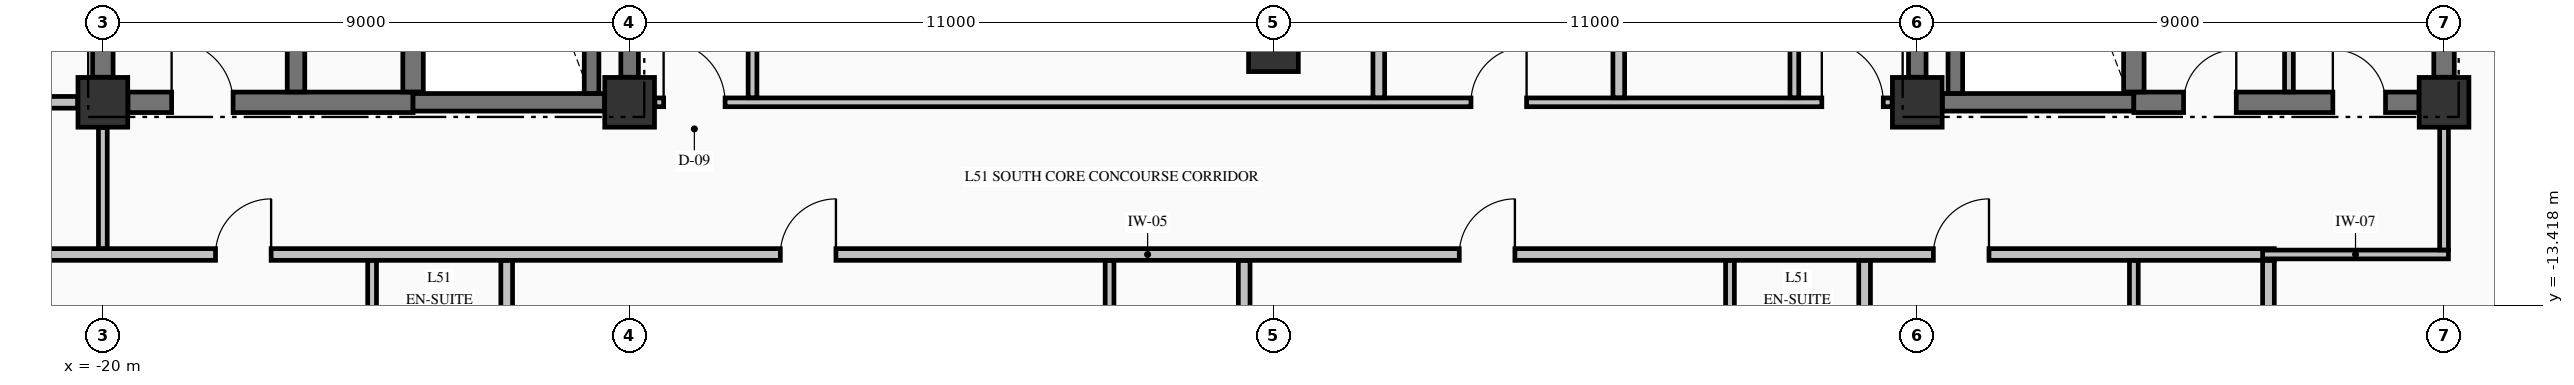
"""IFC4 building model, lengths in metres.
Left out: names, types, materials, properties, quantities, classifications, styles, units other than length and angle.
Written with IfcOpenShell. Run it as: python <this file> out.ifc"""

import sys

from ifc_helpers import new_model, si_unit, direction, frame, frame_2d, origin, origin_2d, place, context, subcontext, project, spatial, rectangle, extrude, element, fill, save


model = new_model("IFC4")
c1 = context("Model", 3, precision=1e-05, world=origin(), true_north=direction((0.0, 1.0)))
c2 = subcontext(c1, "Body", "Model", "MODEL_VIEW")
j1 = project(units=[si_unit("LENGTHUNIT", "METRE"), si_unit("PLANEANGLEUNIT", "RADIAN")], contexts=[c1])
p1 = place(None, origin())
s1 = spatial("IfcSite", under=j1, at=p1, CompositionType="ELEMENT")
p2 = place(p1, origin())
s2 = spatial("IfcBuilding", under=s1, at=p2, CompositionType="ELEMENT")
p3 = place(p2, frame((0.0, 0.0, 198.26)))
s3 = spatial("IfcBuildingStorey", under=s2, at=p3, CompositionType="ELEMENT", Elevation=198.26)
for number, where, z_axis, x_axis in (
    (1, (-20.0, -9.95, -0.25), (0.0, 0.0, 1.0), (1.0, 0.0, 0.0)),
    (2, (-11.0, -9.95, -0.25), (0.0, 0.0, 1.0), (1.0, 0.0, 0.0)),
    (3, (11.0, -9.95, -0.25), (0.0, 0.0, 1.0), (1.0, 0.0, 0.0)),
    (4, (20.0, -9.95, -0.25), (0.0, 0.0, 1.0), (1.0, 0.0, 0.0)),
    (5, (0.0, -9.0, -0.25), (0.0, 0.0, 1.0), (1.0, 0.0, 0.0)),
):
    element("IfcColumn", number, at=place(p3, frame(where, z_axis=z_axis, x_axis=x_axis)), inside=s3, PredefinedType="COLUMN", context=c2, shape_type="SweptSolid", body=[
        extrude(rectangle(XDim=0.85, YDim=0.85, at=origin_2d()), origin(), (0.0, 0.0, 1.0), 3.4),
    ])
p4 = place(p3, frame((-19.571, -9.95, 0.0), z_axis=(0.0, 0.0, 1.0), x_axis=(1.0, 0.0, 0.0)))
e6 = element("IfcWall", 6, at=p4, inside=s3, PredefinedType="SHEAR", context=c2, shape_type="SweptSolid", body=[
    extrude(rectangle(XDim=4.871, YDim=0.35, at=frame_2d((2.436, 0.0))), origin(), (0.0, 0.0, 1.0), 3.15),
])
p5 = place(p4, frame((0.746, 0.0, 0.0)))
e7 = element("IfcOpeningElement", 7, at=p5, cuts=e6, PredefinedType="OPENING", context=c2, shape_type="SweptSolid", body=[
    extrude(rectangle(XDim=1.05, YDim=2.15, at=frame_2d((0.525, 1.075))), frame((0.0, 0.185, 0.0), z_axis=(0.0, -1.0, 0.0), x_axis=(1.0, 0.0, 0.0)), (0.0, 0.0, 1.0), 0.37),
])
for number, where, z_axis, x_axis in (
    (8, (-14.7, -9.95, 0.0), (0.0, 0.0, 1.0), (1.0, 0.0, 0.0)),
    (9, (11.429, -9.95, 0.0), (0.0, 0.0, 1.0), (1.0, 0.0, 0.0)),
):
    element("IfcWall", number, at=place(p3, frame(where, z_axis=z_axis, x_axis=x_axis)), inside=s3, PredefinedType="SHEAR", context=c2, shape_type="SweptSolid", body=[
        extrude(rectangle(XDim=3.271, YDim=0.3, at=frame_2d((1.635, 0.0))), origin(), (0.0, 0.0, 1.0), 3.15),
    ])
p6 = place(p3, frame((14.7, -9.95, 0.0), z_axis=(0.0, 0.0, 1.0), x_axis=(1.0, 0.0, 0.0)))
e10 = element("IfcWall", 10, at=p6, inside=s3, PredefinedType="SHEAR", context=c2, shape_type="SweptSolid", body=[
    extrude(rectangle(XDim=4.871, YDim=0.35, at=frame_2d((2.436, 0.0))), origin(), (0.0, 0.0, 1.0), 3.15),
])
p7 = place(p6, frame((0.85, 0.0, 0.0)))
e11 = element("IfcOpeningElement", 11, at=p7, cuts=e10, PredefinedType="OPENING", context=c2, shape_type="SweptSolid", body=[
    extrude(rectangle(XDim=0.9, YDim=2.15, at=frame_2d((0.45, 1.075))), frame((0.0, 0.185, 0.0), z_axis=(0.0, -1.0, 0.0), x_axis=(1.0, 0.0, 0.0)), (0.0, 0.0, 1.0), 0.37),
])
p8 = place(p6, frame((3.4, 0.0, 0.0)))
e12 = element("IfcOpeningElement", 12, at=p8, cuts=e10, PredefinedType="OPENING", context=c2, shape_type="SweptSolid", body=[
    extrude(rectangle(XDim=0.9, YDim=2.15, at=frame_2d((0.45, 1.075))), frame((0.0, 0.185, 0.0), z_axis=(0.0, -1.0, 0.0), x_axis=(1.0, 0.0, 0.0)), (0.0, 0.0, 1.0), 0.37),
])
p9 = place(p3, frame((-22.1, -12.55, 0.0), z_axis=(0.0, 0.0, 1.0), x_axis=(1.0, 0.0, 0.0)))
e13 = element("IfcWall", 13, at=p9, inside=s3, PredefinedType="PARTITIONING", context=c2, shape_type="SweptSolid", body=[
    extrude(rectangle(XDim=39.2, YDim=0.2, at=frame_2d((19.6, 0.0))), origin(), (0.0, 0.0, 1.0), 3.15),
])
p10 = place(p9, frame((4.025, 0.0, 0.0)))
e14 = element("IfcOpeningElement", 14, at=p10, cuts=e13, PredefinedType="OPENING", context=c2, shape_type="SweptSolid", body=[
    extrude(rectangle(XDim=0.95, YDim=2.15, at=frame_2d((0.475, 1.075))), frame((0.0, 0.11, 0.0), z_axis=(0.0, -1.0, 0.0), x_axis=(1.0, 0.0, 0.0)), (0.0, 0.0, 1.0), 0.22),
])
p11 = place(p9, frame((13.675, 0.0, 0.0)))
e15 = element("IfcOpeningElement", 15, at=p11, cuts=e13, PredefinedType="OPENING", context=c2, shape_type="SweptSolid", body=[
    extrude(rectangle(XDim=0.95, YDim=2.15, at=frame_2d((0.475, 1.075))), frame((0.0, 0.11, 0.0), z_axis=(0.0, -1.0, 0.0), x_axis=(1.0, 0.0, 0.0)), (0.0, 0.0, 1.0), 0.22),
])
p12 = place(p9, frame((25.275, 0.0, 0.0)))
e16 = element("IfcOpeningElement", 16, at=p12, cuts=e13, PredefinedType="OPENING", context=c2, shape_type="SweptSolid", body=[
    extrude(rectangle(XDim=0.95, YDim=2.15, at=frame_2d((0.475, 1.075))), frame((0.0, 0.11, 0.0), z_axis=(0.0, -1.0, 0.0), x_axis=(1.0, 0.0, 0.0)), (0.0, 0.0, 1.0), 0.22),
])
p13 = place(p9, frame((33.375, 0.0, 0.0)))
e17 = element("IfcOpeningElement", 17, at=p13, cuts=e13, PredefinedType="OPENING", context=c2, shape_type="SweptSolid", body=[
    extrude(rectangle(XDim=0.95, YDim=2.15, at=frame_2d((0.475, 1.075))), frame((0.0, 0.11, 0.0), z_axis=(0.0, -1.0, 0.0), x_axis=(1.0, 0.0, 0.0)), (0.0, 0.0, 1.0), 0.22),
])
p14 = place(p3, frame((16.9, -12.55, 0.0), z_axis=(0.0, 0.0, 1.0), x_axis=(1.0, 0.0, 0.0)))
e18 = element("IfcWall", 18, at=p14, inside=s3, PredefinedType="PARTITIONING", context=c2, shape_type="SweptSolid", body=[
    extrude(rectangle(XDim=3.175, YDim=0.15, at=frame_2d((1.587, 0.0))), origin(), (0.0, 0.0, 1.0), 3.15),
])
p15 = place(p3, frame((-26.835, -9.95, 0.0), z_axis=(0.0, 0.0, 1.0), x_axis=(1.0, 0.0, 0.0)))
e19 = element("IfcWall", 19, at=p15, inside=s3, PredefinedType="PARTITIONING", context=c2, shape_type="SweptSolid", body=[
    extrude(rectangle(XDim=6.404, YDim=0.2, at=frame_2d((3.202, 0.0))), origin(), (0.0, 0.0, 1.0), 3.15),
])
p16 = place(p3, frame((-10.569, -9.95, 0.0), z_axis=(0.0, 0.0, 1.0), x_axis=(1.0, 0.0, 0.0)))
e20 = element("IfcWall", 20, at=p16, inside=s3, PredefinedType="PARTITIONING", context=c2, shape_type="SweptSolid", body=[
    extrude(rectangle(XDim=21.138, YDim=0.15, at=frame_2d((10.569, 0.0))), origin(), (0.0, 0.0, 1.0), 3.15),
])
p17 = place(p16, frame((0.15, 0.0, 0.0)))
e21 = element("IfcOpeningElement", 21, at=p17, cuts=e20, PredefinedType="OPENING", context=c2, shape_type="SweptSolid", body=[
    extrude(rectangle(XDim=1.05, YDim=2.15, at=frame_2d((0.525, 1.075))), frame((0.0, 0.085, 0.0), z_axis=(0.0, -1.0, 0.0), x_axis=(1.0, 0.0, 0.0)), (0.0, 0.0, 1.0), 0.17),
])
p18 = place(p16, frame((19.938, 0.0, 0.0)))
e22 = element("IfcOpeningElement", 22, at=p18, cuts=e20, PredefinedType="OPENING", context=c2, shape_type="SweptSolid", body=[
    extrude(rectangle(XDim=1.05, YDim=2.15, at=frame_2d((0.525, 1.075))), frame((0.0, 0.085, 0.0), z_axis=(0.0, -1.0, 0.0), x_axis=(1.0, 0.0, 0.0)), (0.0, 0.0, 1.0), 0.17),
])
p19 = place(p16, frame((13.944, 0.0, 0.0)))
e23 = element("IfcOpeningElement", 23, at=p19, cuts=e20, PredefinedType="OPENING", context=c2, shape_type="SweptSolid", body=[
    extrude(rectangle(XDim=0.95, YDim=2.15, at=frame_2d((0.475, 1.075))), frame((0.0, 0.085, 0.0), z_axis=(0.0, -1.0, 0.0), x_axis=(1.0, 0.0, 0.0)), (0.0, 0.0, 1.0), 0.17),
])
p20 = place(p3, frame((-20.0, -9.521, 0.0), z_axis=(0.0, 0.0, 1.0), x_axis=(0.0, 1.0, 0.0)))
e24 = element("IfcWall", 24, at=p20, inside=s3, PredefinedType="SHEAR", context=c2, shape_type="SweptSolid", body=[
    extrude(rectangle(XDim=9.092, YDim=0.35, at=frame_2d((4.546, 0.0))), origin(), (0.0, 0.0, 1.0), 3.15),
])
p21 = place(p3, frame((-16.7, -9.773, 0.0), z_axis=(0.0, 0.0, 1.0), x_axis=(0.0, 1.0, 0.0)))
e25 = element("IfcWall", 25, at=p21, inside=s3, PredefinedType="SHEAR", context=c2, shape_type="SweptSolid", body=[
    extrude(rectangle(XDim=9.371, YDim=0.3, at=frame_2d((4.686, 0.0))), origin(), (0.0, 0.0, 1.0), 3.15),
])
p22 = place(p3, frame((-14.7, -9.773, 0.0), z_axis=(0.0, 0.0, 1.0), x_axis=(0.0, 1.0, 0.0)))
e26 = element("IfcWall", 26, at=p22, inside=s3, PredefinedType="SHEAR", context=c2, shape_type="SweptSolid", body=[
    extrude(rectangle(XDim=9.371, YDim=0.35, at=frame_2d((4.686, 0.0))), origin(), (0.0, 0.0, 1.0), 3.15),
])
p23 = place(p3, frame((-11.65, -9.798, 0.0), z_axis=(0.0, 0.0, 1.0), x_axis=(0.0, 1.0, 0.0)))
e27 = element("IfcWall", 27, at=p23, inside=s3, PredefinedType="SOLIDWALL", context=c2, shape_type="SweptSolid", body=[
    extrude(rectangle(XDim=9.396, YDim=0.25, at=frame_2d((4.698, 0.0))), origin(), (0.0, 0.0, 1.0), 3.15),
])
for number, where, z_axis, x_axis in (
    (28, (-11.0, -9.521, 0.0), (0.0, 0.0, 1.0), (0.0, 1.0, 0.0)),
    (29, (11.0, -9.521, 0.0), (0.0, 0.0, 1.0), (0.0, 1.0, 0.0)),
):
    element("IfcWall", number, at=place(p3, frame(where, z_axis=z_axis, x_axis=x_axis)), inside=s3, PredefinedType="SHEAR", context=c2, shape_type="SweptSolid", body=[
        extrude(rectangle(XDim=9.092, YDim=0.3, at=frame_2d((4.546, 0.0))), origin(), (0.0, 0.0, 1.0), 3.15),
    ])
p24 = place(p3, frame((11.65, -9.798, 0.0), z_axis=(0.0, 0.0, 1.0), x_axis=(0.0, 1.0, 0.0)))
e30 = element("IfcWall", 30, at=p24, inside=s3, PredefinedType="SOLIDWALL", context=c2, shape_type="SweptSolid", body=[
    extrude(rectangle(XDim=9.396, YDim=0.25, at=frame_2d((4.698, 0.0))), origin(), (0.0, 0.0, 1.0), 3.15),
])
p25 = place(p3, frame((14.7, -9.773, 0.0), z_axis=(0.0, 0.0, 1.0), x_axis=(0.0, 1.0, 0.0)))
e31 = element("IfcWall", 31, at=p25, inside=s3, PredefinedType="SHEAR", context=c2, shape_type="SweptSolid", body=[
    extrude(rectangle(XDim=9.371, YDim=0.35, at=frame_2d((4.686, 0.0))), origin(), (0.0, 0.0, 1.0), 3.15),
])
p26 = place(p3, frame((20.0, -9.521, 0.0), z_axis=(0.0, 0.0, 1.0), x_axis=(0.0, 1.0, 0.0)))
e32 = element("IfcWall", 32, at=p26, inside=s3, PredefinedType="SHEAR", context=c2, shape_type="SweptSolid", body=[
    extrude(rectangle(XDim=9.092, YDim=0.35, at=frame_2d((4.546, 0.0))), origin(), (0.0, 0.0, 1.0), 3.15),
])
p27 = place(p3, frame((-20.0, -12.447, 0.0), z_axis=(0.0, 0.0, 1.0), x_axis=(0.0, 1.0, 0.0)))
e33 = element("IfcWall", 33, at=p27, inside=s3, PredefinedType="PARTITIONING", context=c2, shape_type="SweptSolid", body=[
    extrude(rectangle(XDim=2.066, YDim=0.15, at=frame_2d((1.033, 0.0))), origin(), (0.0, 0.0, 1.0), 2.342),
])
p28 = place(p3, frame((-15.4, -15.422, 0.0), z_axis=(0.0, 0.0, 1.0), x_axis=(0.0, 1.0, 0.0)))
e34 = element("IfcWall", 34, at=p28, inside=s3, PredefinedType="PARTITIONING", context=c2, shape_type="SweptSolid", body=[
    extrude(rectangle(XDim=2.769, YDim=0.15, at=frame_2d((1.385, 0.0))), origin(), (0.0, 0.0, 1.0), 3.15),
])
p29 = place(p3, frame((-13.1, -15.422, 0.0), z_axis=(0.0, 0.0, 1.0), x_axis=(0.0, 1.0, 0.0)))
e35 = element("IfcWall", 35, at=p29, inside=s3, PredefinedType="PARTITIONING", context=c2, shape_type="SweptSolid", body=[
    extrude(rectangle(XDim=2.769, YDim=0.2, at=frame_2d((1.385, 0.0))), origin(), (0.0, 0.0, 1.0), 3.15),
])
p30 = place(p3, frame((-8.9, -9.872, 0.0), z_axis=(0.0, 0.0, 1.0), x_axis=(0.0, 1.0, 0.0)))
e36 = element("IfcWall", 36, at=p30, inside=s3, PredefinedType="PARTITIONING", context=c2, shape_type="SweptSolid", body=[
    extrude(rectangle(XDim=11.969, YDim=0.15, at=frame_2d((5.984, 0.0))), origin(), (0.0, 0.0, 1.0), 3.15),
])
p31 = place(p30, frame((5.502, 0.0, 0.0)))
e37 = element("IfcOpeningElement", 37, at=p31, cuts=e36, PredefinedType="OPENING", context=c2, shape_type="SweptSolid", body=[
    extrude(rectangle(XDim=1.0, YDim=2.15, at=frame_2d((0.5, 1.075))), frame((0.0, 0.085, 0.0), z_axis=(0.0, -1.0, 0.0), x_axis=(1.0, 0.0, 0.0)), (0.0, 0.0, 1.0), 0.17),
])
p32 = place(p3, frame((-2.8, -14.722, 0.0), z_axis=(0.0, 0.0, 1.0), x_axis=(0.0, 1.0, 0.0)))
e38 = element("IfcWall", 38, at=p32, inside=s3, PredefinedType="PARTITIONING", context=c2, shape_type="SweptSolid", body=[
    extrude(rectangle(XDim=2.069, YDim=0.15, at=frame_2d((1.034, 0.0))), origin(), (0.0, 0.0, 1.0), 3.15),
])
p33 = place(p3, frame((-0.5, -14.722, 0.0), z_axis=(0.0, 0.0, 1.0), x_axis=(0.0, 1.0, 0.0)))
e39 = element("IfcWall", 39, at=p33, inside=s3, PredefinedType="PARTITIONING", context=c2, shape_type="SweptSolid", body=[
    extrude(rectangle(XDim=2.069, YDim=0.2, at=frame_2d((1.034, 0.0))), origin(), (0.0, 0.0, 1.0), 3.15),
])
for number, where, z_axis, x_axis in (
    (40, (1.8, -9.872, 0.0), (0.0, 0.0, 1.0), (0.0, 1.0, 0.0)),
    (41, (5.9, -9.872, 0.0), (0.0, 0.0, 1.0), (0.0, 1.0, 0.0)),
):
    element("IfcWall", number, at=place(p3, frame(where, z_axis=z_axis, x_axis=x_axis)), inside=s3, PredefinedType="PARTITIONING", context=c2, shape_type="SweptSolid", body=[
        extrude(rectangle(XDim=4.569, YDim=0.2, at=frame_2d((2.285, 0.0))), origin(), (0.0, 0.0, 1.0), 3.15),
    ])
p34 = place(p3, frame((7.8, -15.422, 0.0), z_axis=(0.0, 0.0, 1.0), x_axis=(0.0, 1.0, 0.0)))
e42 = element("IfcWall", 42, at=p34, inside=s3, PredefinedType="PARTITIONING", context=c2, shape_type="SweptSolid", body=[
    extrude(rectangle(XDim=2.769, YDim=0.15, at=frame_2d((1.385, 0.0))), origin(), (0.0, 0.0, 1.0), 3.15),
])
p35 = place(p3, frame((8.9, -9.872, 0.0), z_axis=(0.0, 0.0, 1.0), x_axis=(0.0, 1.0, 0.0)))
e43 = element("IfcWall", 43, at=p35, inside=s3, PredefinedType="PARTITIONING", context=c2, shape_type="SweptSolid", body=[
    extrude(rectangle(XDim=4.569, YDim=0.15, at=frame_2d((2.285, 0.0))), origin(), (0.0, 0.0, 1.0), 3.15),
])
p36 = place(p35, frame((1.847, 0.0, 0.0)))
e44 = element("IfcOpeningElement", 44, at=p36, cuts=e43, PredefinedType="OPENING", context=c2, shape_type="SweptSolid", body=[
    extrude(rectangle(XDim=0.95, YDim=2.15, at=frame_2d((0.475, 1.075))), frame((0.0, 0.085, 0.0), z_axis=(0.0, -1.0, 0.0), x_axis=(1.0, 0.0, 0.0)), (0.0, 0.0, 1.0), 0.17),
])
p37 = place(p3, frame((10.1, -15.422, 0.0), z_axis=(0.0, 0.0, 1.0), x_axis=(0.0, 1.0, 0.0)))
e45 = element("IfcWall", 45, at=p37, inside=s3, PredefinedType="PARTITIONING", context=c2, shape_type="SweptSolid", body=[
    extrude(rectangle(XDim=2.769, YDim=0.2, at=frame_2d((1.385, 0.0))), origin(), (0.0, 0.0, 1.0), 3.15),
])
p38 = place(p3, frame((14.7, -14.722, 0.0), z_axis=(0.0, 0.0, 1.0), x_axis=(0.0, 1.0, 0.0)))
e46 = element("IfcWall", 46, at=p38, inside=s3, PredefinedType="PARTITIONING", context=c2, shape_type="SweptSolid", body=[
    extrude(rectangle(XDim=2.069, YDim=0.15, at=frame_2d((1.034, 0.0))), origin(), (0.0, 0.0, 1.0), 3.15),
])
p39 = place(p3, frame((17.0, -14.722, 0.0), z_axis=(0.0, 0.0, 1.0), x_axis=(0.0, 1.0, 0.0)))
e47 = element("IfcWall", 47, at=p39, inside=s3, PredefinedType="PARTITIONING", context=c2, shape_type="SweptSolid", body=[
    extrude(rectangle(XDim=2.069, YDim=0.2, at=frame_2d((1.034, 0.0))), origin(), (0.0, 0.0, 1.0), 3.15),
])
p40 = place(p3, frame((17.35, -9.772, 0.0), z_axis=(0.0, 0.0, 1.0), x_axis=(0.0, 1.0, 0.0)))
e48 = element("IfcWall", 48, at=p40, inside=s3, PredefinedType="PARTITIONING", context=c2, shape_type="SweptSolid", body=[
    extrude(rectangle(XDim=14.494, YDim=0.15, at=frame_2d((7.247, 0.0))), origin(), (0.0, 0.0, 1.0), 3.15),
])
p41 = place(p3, frame((20.0, -12.472, 0.0), z_axis=(0.0, 0.0, 1.0), x_axis=(0.0, 1.0, 0.0)))
e49 = element("IfcWall", 49, at=p41, inside=s3, PredefinedType="PARTITIONING", context=c2, shape_type="SweptSolid", body=[
    extrude(rectangle(XDim=2.091, YDim=0.15, at=frame_2d((1.045, 0.0))), origin(), (0.0, 0.0, 1.0), 2.342),
])
p42 = place(p5, origin())
e50 = element("IfcDoor", 50, at=p42, inside=s3, OperationType="SINGLE_SWING_LEFT", PredefinedType="DOOR", context=c2, shape_type="SweptSolid", body=[
    extrude(rectangle(XDim=1.05, YDim=2.15, at=frame_2d((0.525, 1.075))), frame((0.0, 0.025, 0.0), z_axis=(0.0, -1.0, 0.0), x_axis=(1.0, 0.0, 0.0)), (0.0, 0.0, 1.0), 0.05),
])
fill(e7, e50)
p43 = place(p7, origin())
e51 = element("IfcDoor", 51, at=p43, inside=s3, OperationType="SINGLE_SWING_RIGHT", PredefinedType="DOOR", context=c2, shape_type="SweptSolid", body=[
    extrude(rectangle(XDim=0.9, YDim=2.15, at=frame_2d((0.45, 1.075))), frame((0.0, 0.025, 0.0), z_axis=(0.0, -1.0, 0.0), x_axis=(1.0, 0.0, 0.0)), (0.0, 0.0, 1.0), 0.05),
])
fill(e11, e51)
p44 = place(p8, origin())
e52 = element("IfcDoor", 52, at=p44, inside=s3, OperationType="SINGLE_SWING_LEFT", PredefinedType="DOOR", context=c2, shape_type="SweptSolid", body=[
    extrude(rectangle(XDim=0.9, YDim=2.15, at=frame_2d((0.45, 1.075))), frame((0.0, 0.025, 0.0), z_axis=(0.0, -1.0, 0.0), x_axis=(1.0, 0.0, 0.0)), (0.0, 0.0, 1.0), 0.05),
])
fill(e12, e52)
p45 = place(p17, origin())
e53 = element("IfcDoor", 53, at=p45, inside=s3, OperationType="SINGLE_SWING_LEFT", PredefinedType="DOOR", context=c2, shape_type="SweptSolid", body=[
    extrude(rectangle(XDim=1.05, YDim=2.15, at=frame_2d((0.525, 1.075))), frame((0.0, 0.025, 0.0), z_axis=(0.0, -1.0, 0.0), x_axis=(1.0, 0.0, 0.0)), (0.0, 0.0, 1.0), 0.05),
])
fill(e21, e53)
p46 = place(p18, origin())
e54 = element("IfcDoor", 54, at=p46, inside=s3, OperationType="SINGLE_SWING_LEFT", PredefinedType="DOOR", context=c2, shape_type="SweptSolid", body=[
    extrude(rectangle(XDim=1.05, YDim=2.15, at=frame_2d((0.525, 1.075))), frame((0.0, 0.025, 0.0), z_axis=(0.0, -1.0, 0.0), x_axis=(1.0, 0.0, 0.0)), (0.0, 0.0, 1.0), 0.05),
])
fill(e22, e54)
p47 = place(p10, origin())
e55 = element("IfcDoor", 55, at=p47, inside=s3, OperationType="SINGLE_SWING_RIGHT", PredefinedType="DOOR", context=c2, shape_type="SweptSolid", body=[
    extrude(rectangle(XDim=0.95, YDim=2.15, at=frame_2d((0.475, 1.075))), frame((0.0, 0.025, 0.0), z_axis=(0.0, -1.0, 0.0), x_axis=(1.0, 0.0, 0.0)), (0.0, 0.0, 1.0), 0.05),
])
fill(e14, e55)
p48 = place(p11, origin())
e56 = element("IfcDoor", 56, at=p48, inside=s3, OperationType="SINGLE_SWING_RIGHT", PredefinedType="DOOR", context=c2, shape_type="SweptSolid", body=[
    extrude(rectangle(XDim=0.95, YDim=2.15, at=frame_2d((0.475, 1.075))), frame((0.0, 0.025, 0.0), z_axis=(0.0, -1.0, 0.0), x_axis=(1.0, 0.0, 0.0)), (0.0, 0.0, 1.0), 0.05),
])
fill(e15, e56)
p49 = place(p12, origin())
e57 = element("IfcDoor", 57, at=p49, inside=s3, OperationType="SINGLE_SWING_RIGHT", PredefinedType="DOOR", context=c2, shape_type="SweptSolid", body=[
    extrude(rectangle(XDim=0.95, YDim=2.15, at=frame_2d((0.475, 1.075))), frame((0.0, 0.025, 0.0), z_axis=(0.0, -1.0, 0.0), x_axis=(1.0, 0.0, 0.0)), (0.0, 0.0, 1.0), 0.05),
])
fill(e16, e57)
p50 = place(p13, origin())
e58 = element("IfcDoor", 58, at=p50, inside=s3, OperationType="SINGLE_SWING_RIGHT", PredefinedType="DOOR", context=c2, shape_type="SweptSolid", body=[
    extrude(rectangle(XDim=0.95, YDim=2.15, at=frame_2d((0.475, 1.075))), frame((0.0, 0.025, 0.0), z_axis=(0.0, -1.0, 0.0), x_axis=(1.0, 0.0, 0.0)), (0.0, 0.0, 1.0), 0.05),
])
fill(e17, e58)
p51 = place(p19, origin())
e59 = element("IfcDoor", 59, at=p51, inside=s3, OperationType="SINGLE_SWING_RIGHT", PredefinedType="DOOR", context=c2, shape_type="SweptSolid", body=[
    extrude(rectangle(XDim=0.95, YDim=2.15, at=frame_2d((0.475, 1.075))), frame((0.0, 0.025, 0.0), z_axis=(0.0, -1.0, 0.0), x_axis=(1.0, 0.0, 0.0)), (0.0, 0.0, 1.0), 0.05),
])
fill(e23, e59)
save(model, sys.argv[1])
